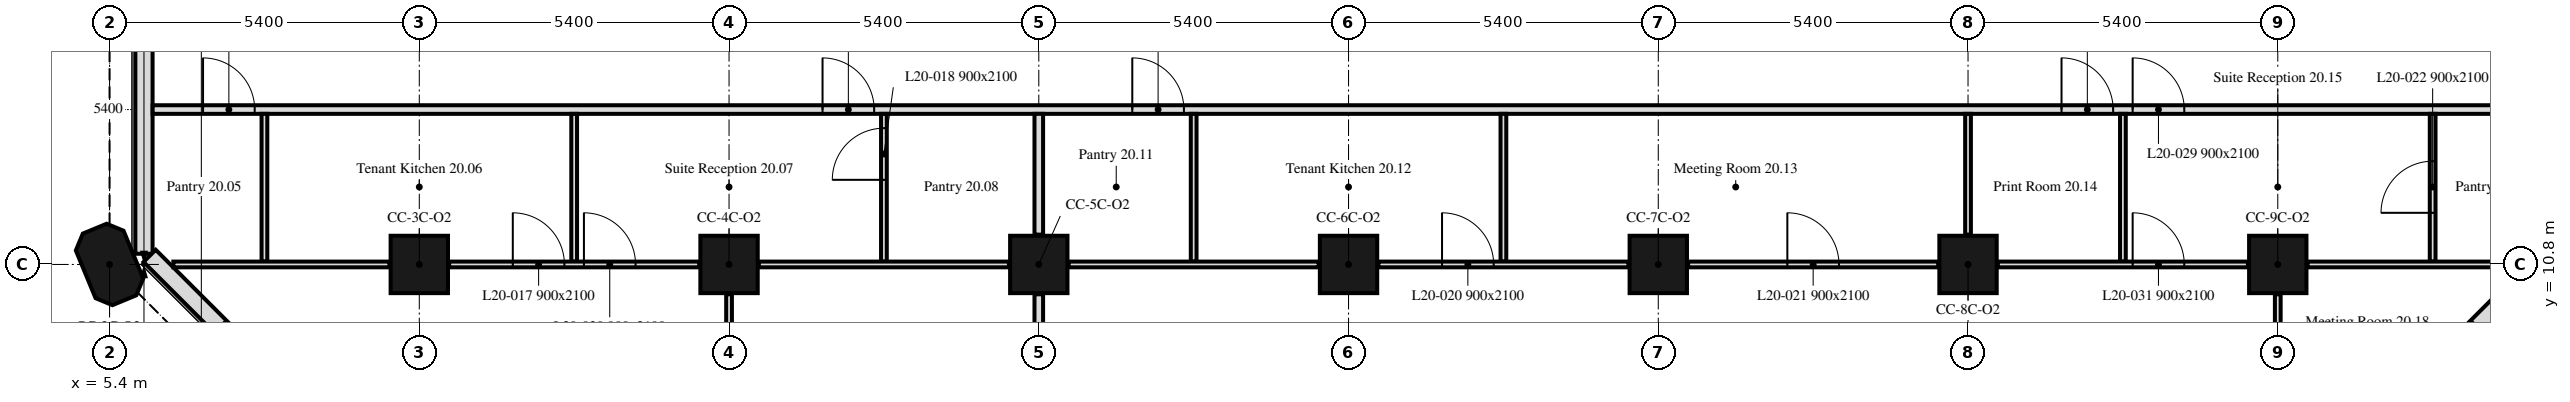
"""IFC4 building model, lengths in metres.
Left out: names, types, materials, properties, quantities, classifications, styles, units other than length and angle.
Written with IfcOpenShell. Run it as: python <this file> out.ifc"""

import sys

from ifc_helpers import new_model, si_unit, direction, frame, frame_2d, origin, origin_2d, place, context, subcontext, project, spatial, polyline, rectangle, outline, extrude, element, fill, save


model = new_model("IFC4")
c1 = context("Model", 3, precision=1e-05, world=origin(), true_north=direction((0.0, 1.0)))
c2 = subcontext(c1, "Body", "Model", "MODEL_VIEW")
j1 = project(units=[si_unit("LENGTHUNIT", "METRE"), si_unit("PLANEANGLEUNIT", "RADIAN")], contexts=[c1])
p1 = place(None, origin())
s1 = spatial("IfcSite", under=j1, at=p1, CompositionType="ELEMENT")
p2 = place(p1, origin())
s2 = spatial("IfcBuilding", under=s1, at=p2, CompositionType="ELEMENT")
p3 = place(p2, frame((0.0, 0.0, 87.8)))
s3 = spatial("IfcBuildingStorey", under=s2, at=p3, CompositionType="ELEMENT", Elevation=87.8)
p4 = place(p3, frame((5.4, 10.8, 0.0), z_axis=(0.0, 0.0, 1.0), x_axis=(-0.382683432365, 0.923879532511, 0.0)))
e1 = element("IfcColumn", 1, at=p4, inside=s3, PredefinedType="COLUMN", context=c2, shape_type="SweptSolid", body=[
    extrude(outline(polyline([(-0.45, -0.45), (0.45, -0.45), (0.675, -0.225), (0.675, 0.225), (0.45, 0.45), (-0.45, 0.45), (-0.675, 0.225), (-0.675, -0.225), (-0.45, -0.45)])), origin(), (0.0, 0.0, 1.0), 3.5),
])
for number, where, z_axis, x_axis in (
    (2, (10.8, 10.8, 0.0), (0.0, 0.0, 1.0), (1.0, 0.0, 0.0)),
    (3, (16.2, 10.8, 0.0), (0.0, 0.0, 1.0), (1.0, 0.0, 0.0)),
    (4, (21.6, 10.8, 0.0), (0.0, 0.0, 1.0), (1.0, 0.0, 0.0)),
    (5, (27.0, 10.8, 0.0), (0.0, 0.0, 1.0), (1.0, 0.0, 0.0)),
    (6, (32.4, 10.8, 0.0), (0.0, 0.0, 1.0), (1.0, 0.0, 0.0)),
    (7, (37.8, 10.8, 0.0), (0.0, 0.0, 1.0), (1.0, 0.0, 0.0)),
    (8, (43.2, 10.8, 0.0), (0.0, 0.0, 1.0), (1.0, 0.0, 0.0)),
):
    element("IfcColumn", number, at=place(p3, frame(where, z_axis=z_axis, x_axis=x_axis)), inside=s3, PredefinedType="COLUMN", context=c2, shape_type="SweptSolid", body=[
        extrude(rectangle(XDim=1.0, YDim=1.0, at=origin_2d()), origin(), (0.0, 0.0, 1.0), 3.5),
    ])
p5 = place(p3, frame((43.051, 6.099, 0.0), z_axis=(0.0, 0.0, 1.0), x_axis=(0.707106781187, 0.707106781187, 0.0)))
e9 = element("IfcWall", 9, at=p5, inside=s3, PredefinedType="SOLIDWALL", context=c2, shape_type="SweptSolid", body=[
    extrude(rectangle(XDim=6.86, YDim=0.3, at=frame_2d((3.43, 0.0))), origin(), (0.0, 0.0, 1.0), 3.5),
])
p6 = place(p5, frame((1.73, 0.0, 0.9)))
e10 = element("IfcOpeningElement", 10, at=p6, cuts=e9, PredefinedType="OPENING", context=c2, shape_type="SweptSolid", body=[
    extrude(rectangle(XDim=3.4, YDim=1.7, at=frame_2d((1.7, 0.85))), frame((0.0, 0.16, 0.0), z_axis=(0.0, -1.0, 0.0), x_axis=(1.0, 0.0, 0.0)), (0.0, 0.0, 1.0), 0.32),
])
p7 = place(p3, frame((6.0, 16.2, 0.0), z_axis=(0.0, 0.0, 1.0), x_axis=(0.0, -1.0, 0.0)))
e11 = element("IfcWall", 11, at=p7, inside=s3, PredefinedType="SOLIDWALL", context=c2, shape_type="SweptSolid", body=[
    extrude(rectangle(XDim=5.214, YDim=0.3, at=frame_2d((2.607, 0.0))), origin(), (0.0, 0.0, 1.0), 3.5),
])
p8 = place(p3, frame((6.099, 10.949, 0.0), z_axis=(0.0, 0.0, 1.0), x_axis=(0.707106781187, -0.707106781187, 0.0)))
e12 = element("IfcWall", 12, at=p8, inside=s3, PredefinedType="SOLIDWALL", context=c2, shape_type="SweptSolid", body=[
    extrude(rectangle(XDim=6.86, YDim=0.3, at=frame_2d((3.43, 0.0))), origin(), (0.0, 0.0, 1.0), 3.5),
])
p9 = place(p8, frame((1.73, 0.0, 0.9)))
e13 = element("IfcOpeningElement", 13, at=p9, cuts=e12, PredefinedType="OPENING", context=c2, shape_type="SweptSolid", body=[
    extrude(rectangle(XDim=3.4, YDim=1.7, at=frame_2d((1.7, 0.85))), frame((0.0, 0.16, 0.0), z_axis=(0.0, -1.0, 0.0), x_axis=(1.0, 0.0, 0.0)), (0.0, 0.0, 1.0), 0.32),
])
p10 = place(p3, frame((6.151, 13.5, 0.0), z_axis=(0.0, 0.0, 1.0), x_axis=(1.0, 0.0, 0.0)))
e14 = element("IfcWall", 14, at=p10, inside=s3, PredefinedType="PARTITIONING", context=c2, shape_type="SweptSolid", body=[
    extrude(rectangle(XDim=41.698, YDim=0.15, at=frame_2d((20.849, 0.0))), origin(), (0.0, 0.0, 1.0), 3.5),
])
p11 = place(p10, frame((0.879, 0.0, 0.0)))
e15 = element("IfcOpeningElement", 15, at=p11, cuts=e14, PredefinedType="OPENING", context=c2, shape_type="SweptSolid", body=[
    extrude(rectangle(XDim=0.9, YDim=2.1, at=frame_2d((0.45, 1.05))), frame((0.0, 0.075, 0.0), z_axis=(0.0, -1.0, 0.0), x_axis=(1.0, 0.0, 0.0)), (0.0, 0.0, 1.0), 0.15),
])
p12 = place(p10, frame((17.079, 0.0, 0.0)))
e16 = element("IfcOpeningElement", 16, at=p12, cuts=e14, PredefinedType="OPENING", context=c2, shape_type="SweptSolid", body=[
    extrude(rectangle(XDim=0.9, YDim=2.1, at=frame_2d((0.45, 1.05))), frame((0.0, 0.075, 0.0), z_axis=(0.0, -1.0, 0.0), x_axis=(1.0, 0.0, 0.0)), (0.0, 0.0, 1.0), 0.15),
])
p13 = place(p10, frame((33.279, 0.0, 0.0)))
e17 = element("IfcOpeningElement", 17, at=p13, cuts=e14, PredefinedType="OPENING", context=c2, shape_type="SweptSolid", body=[
    extrude(rectangle(XDim=0.9, YDim=2.1, at=frame_2d((0.45, 1.05))), frame((0.0, 0.075, 0.0), z_axis=(0.0, -1.0, 0.0), x_axis=(1.0, 0.0, 0.0)), (0.0, 0.0, 1.0), 0.15),
])
p14 = place(p10, frame((11.679, 0.0, 0.0)))
e18 = element("IfcOpeningElement", 18, at=p14, cuts=e14, PredefinedType="OPENING", context=c2, shape_type="SweptSolid", body=[
    extrude(rectangle(XDim=0.9, YDim=2.1, at=frame_2d((0.45, 1.05))), frame((0.0, 0.075, 0.0), z_axis=(0.0, -1.0, 0.0), x_axis=(1.0, 0.0, 0.0)), (0.0, 0.0, 1.0), 0.15),
])
p15 = place(p10, frame((34.519, 0.0, 0.0)))
e19 = element("IfcOpeningElement", 19, at=p15, cuts=e14, PredefinedType="OPENING", context=c2, shape_type="SweptSolid", body=[
    extrude(rectangle(XDim=0.9, YDim=2.1, at=frame_2d((0.45, 1.05))), frame((0.0, 0.075, 0.0), z_axis=(0.0, -1.0, 0.0), x_axis=(1.0, 0.0, 0.0)), (0.0, 0.0, 1.0), 0.15),
])
p16 = place(p3, frame((8.1, 10.85, 0.0), z_axis=(0.0, 0.0, 1.0), x_axis=(0.0, 1.0, 0.0)))
e20 = element("IfcWall", 20, at=p16, inside=s3, PredefinedType="PARTITIONING", context=c2, shape_type="SweptSolid", body=[
    extrude(rectangle(XDim=2.575, YDim=0.1, at=frame_2d((1.288, 0.0))), origin(), (0.0, 0.0, 1.0), 3.5),
])
p17 = place(p3, frame((6.512, 10.8, 0.0), z_axis=(0.0, 0.0, 1.0), x_axis=(1.0, 0.0, 0.0)))
e21 = element("IfcWall", 21, at=p17, inside=s3, PredefinedType="PARTITIONING", context=c2, shape_type="SweptSolid", body=[
    extrude(rectangle(XDim=3.768, YDim=0.1, at=frame_2d((1.884, 0.0))), origin(), (0.0, 0.0, 1.0), 3.5),
])
p18 = place(p3, frame((13.5, 10.85, 0.0), z_axis=(0.0, 0.0, 1.0), x_axis=(0.0, 1.0, 0.0)))
e22 = element("IfcWall", 22, at=p18, inside=s3, PredefinedType="PARTITIONING", context=c2, shape_type="SweptSolid", body=[
    extrude(rectangle(XDim=2.575, YDim=0.1, at=frame_2d((1.288, 0.0))), origin(), (0.0, 0.0, 1.0), 3.5),
])
p19 = place(p3, frame((11.32, 10.8, 0.0), z_axis=(0.0, 0.0, 1.0), x_axis=(1.0, 0.0, 0.0)))
e23 = element("IfcWall", 23, at=p19, inside=s3, PredefinedType="PARTITIONING", context=c2, shape_type="SweptSolid", body=[
    extrude(rectangle(XDim=4.36, YDim=0.1, at=frame_2d((2.18, 0.0))), origin(), (0.0, 0.0, 1.0), 3.5),
])
p20 = place(p19, frame((1.11, 0.0, 0.0)))
e24 = element("IfcOpeningElement", 24, at=p20, cuts=e23, PredefinedType="OPENING", context=c2, shape_type="SweptSolid", body=[
    extrude(rectangle(XDim=0.9, YDim=2.1, at=frame_2d((0.45, 1.05))), frame((0.0, 0.05, 0.0), z_axis=(0.0, -1.0, 0.0), x_axis=(1.0, 0.0, 0.0)), (0.0, 0.0, 1.0), 0.1),
])
p21 = place(p19, frame((2.35, 0.0, 0.0)))
e25 = element("IfcOpeningElement", 25, at=p21, cuts=e23, PredefinedType="OPENING", context=c2, shape_type="SweptSolid", body=[
    extrude(rectangle(XDim=0.9, YDim=2.1, at=frame_2d((0.45, 1.05))), frame((0.0, 0.05, 0.0), z_axis=(0.0, -1.0, 0.0), x_axis=(1.0, 0.0, 0.0)), (0.0, 0.0, 1.0), 0.1),
])
p22 = place(p3, frame((18.9, 10.85, 0.0), z_axis=(0.0, 0.0, 1.0), x_axis=(0.0, 1.0, 0.0)))
e26 = element("IfcWall", 26, at=p22, inside=s3, PredefinedType="PARTITIONING", context=c2, shape_type="SweptSolid", body=[
    extrude(rectangle(XDim=2.575, YDim=0.1, at=frame_2d((1.288, 0.0))), origin(), (0.0, 0.0, 1.0), 3.5),
])
p23 = place(p22, frame((1.425, 0.0, 0.0)))
e27 = element("IfcOpeningElement", 27, at=p23, cuts=e26, PredefinedType="OPENING", context=c2, shape_type="SweptSolid", body=[
    extrude(rectangle(XDim=0.9, YDim=2.1, at=frame_2d((0.45, 1.05))), frame((0.0, 0.05, 0.0), z_axis=(0.0, -1.0, 0.0), x_axis=(1.0, 0.0, 0.0)), (0.0, 0.0, 1.0), 0.1),
])
p24 = place(p3, frame((16.72, 10.8, 0.0), z_axis=(0.0, 0.0, 1.0), x_axis=(1.0, 0.0, 0.0)))
e28 = element("IfcWall", 28, at=p24, inside=s3, PredefinedType="PARTITIONING", context=c2, shape_type="SweptSolid", body=[
    extrude(rectangle(XDim=4.36, YDim=0.1, at=frame_2d((2.18, 0.0))), origin(), (0.0, 0.0, 1.0), 3.5),
])
p25 = place(p3, frame((21.6, 11.32, 0.0), z_axis=(0.0, 0.0, 1.0), x_axis=(0.0, 1.0, 0.0)))
e29 = element("IfcWall", 29, at=p25, inside=s3, PredefinedType="PARTITIONING", context=c2, shape_type="SweptSolid", body=[
    extrude(rectangle(XDim=2.105, YDim=0.15, at=frame_2d((1.052, 0.0))), origin(), (0.0, 0.0, 1.0), 3.5),
])
p26 = place(p3, frame((16.2, 6.151, 0.0), z_axis=(0.0, 0.0, 1.0), x_axis=(0.0, 1.0, 0.0)))
e30 = element("IfcWall", 30, at=p26, inside=s3, PredefinedType="PARTITIONING", context=c2, shape_type="SweptSolid", body=[
    extrude(rectangle(XDim=4.129, YDim=0.1, at=frame_2d((2.064, 0.0))), origin(), (0.0, 0.0, 1.0), 3.5),
])
p27 = place(p26, frame((1.499, 0.0, 0.0)))
e31 = element("IfcOpeningElement", 31, at=p27, cuts=e30, PredefinedType="OPENING", context=c2, shape_type="SweptSolid", body=[
    extrude(rectangle(XDim=0.9, YDim=2.1, at=frame_2d((0.45, 1.05))), frame((0.0, 0.05, 0.0), z_axis=(0.0, -1.0, 0.0), x_axis=(1.0, 0.0, 0.0)), (0.0, 0.0, 1.0), 0.1),
])
p28 = place(p3, frame((21.6, 6.151, 0.0), z_axis=(0.0, 0.0, 1.0), x_axis=(0.0, 1.0, 0.0)))
e32 = element("IfcWall", 32, at=p28, inside=s3, PredefinedType="PARTITIONING", context=c2, shape_type="SweptSolid", body=[
    extrude(rectangle(XDim=4.129, YDim=0.15, at=frame_2d((2.064, 0.0))), origin(), (0.0, 0.0, 1.0), 3.5),
])
p29 = place(p3, frame((24.3, 10.85, 0.0), z_axis=(0.0, 0.0, 1.0), x_axis=(0.0, 1.0, 0.0)))
e33 = element("IfcWall", 33, at=p29, inside=s3, PredefinedType="PARTITIONING", context=c2, shape_type="SweptSolid", body=[
    extrude(rectangle(XDim=2.575, YDim=0.1, at=frame_2d((1.288, 0.0))), origin(), (0.0, 0.0, 1.0), 3.5),
])
p30 = place(p3, frame((22.12, 10.8, 0.0), z_axis=(0.0, 0.0, 1.0), x_axis=(1.0, 0.0, 0.0)))
e34 = element("IfcWall", 34, at=p30, inside=s3, PredefinedType="PARTITIONING", context=c2, shape_type="SweptSolid", body=[
    extrude(rectangle(XDim=4.36, YDim=0.1, at=frame_2d((2.18, 0.0))), origin(), (0.0, 0.0, 1.0), 3.5),
])
p31 = place(p3, frame((29.7, 10.85, 0.0), z_axis=(0.0, 0.0, 1.0), x_axis=(0.0, 1.0, 0.0)))
e35 = element("IfcWall", 35, at=p31, inside=s3, PredefinedType="PARTITIONING", context=c2, shape_type="SweptSolid", body=[
    extrude(rectangle(XDim=2.575, YDim=0.1, at=frame_2d((1.288, 0.0))), origin(), (0.0, 0.0, 1.0), 3.5),
])
p32 = place(p3, frame((27.52, 10.8, 0.0), z_axis=(0.0, 0.0, 1.0), x_axis=(1.0, 0.0, 0.0)))
e36 = element("IfcWall", 36, at=p32, inside=s3, PredefinedType="PARTITIONING", context=c2, shape_type="SweptSolid", body=[
    extrude(rectangle(XDim=4.36, YDim=0.1, at=frame_2d((2.18, 0.0))), origin(), (0.0, 0.0, 1.0), 3.5),
])
p33 = place(p32, frame((1.11, 0.0, 0.0)))
e37 = element("IfcOpeningElement", 37, at=p33, cuts=e36, PredefinedType="OPENING", context=c2, shape_type="SweptSolid", body=[
    extrude(rectangle(XDim=0.9, YDim=2.1, at=frame_2d((0.45, 1.05))), frame((0.0, 0.05, 0.0), z_axis=(0.0, -1.0, 0.0), x_axis=(1.0, 0.0, 0.0)), (0.0, 0.0, 1.0), 0.1),
])
p34 = place(p3, frame((32.92, 10.8, 0.0), z_axis=(0.0, 0.0, 1.0), x_axis=(1.0, 0.0, 0.0)))
e38 = element("IfcWall", 38, at=p34, inside=s3, PredefinedType="PARTITIONING", context=c2, shape_type="SweptSolid", body=[
    extrude(rectangle(XDim=4.36, YDim=0.1, at=frame_2d((2.18, 0.0))), origin(), (0.0, 0.0, 1.0), 3.5),
])
p35 = place(p34, frame((1.73, 0.0, 0.0)))
e39 = element("IfcOpeningElement", 39, at=p35, cuts=e38, PredefinedType="OPENING", context=c2, shape_type="SweptSolid", body=[
    extrude(rectangle(XDim=0.9, YDim=2.1, at=frame_2d((0.45, 1.05))), frame((0.0, 0.05, 0.0), z_axis=(0.0, -1.0, 0.0), x_axis=(1.0, 0.0, 0.0)), (0.0, 0.0, 1.0), 0.1),
])
p36 = place(p3, frame((37.8, 11.32, 0.0), z_axis=(0.0, 0.0, 1.0), x_axis=(0.0, 1.0, 0.0)))
e40 = element("IfcWall", 40, at=p36, inside=s3, PredefinedType="PARTITIONING", context=c2, shape_type="SweptSolid", body=[
    extrude(rectangle(XDim=2.105, YDim=0.1, at=frame_2d((1.052, 0.0))), origin(), (0.0, 0.0, 1.0), 3.5),
])
p37 = place(p3, frame((40.5, 10.85, 0.0), z_axis=(0.0, 0.0, 1.0), x_axis=(0.0, 1.0, 0.0)))
e41 = element("IfcWall", 41, at=p37, inside=s3, PredefinedType="PARTITIONING", context=c2, shape_type="SweptSolid", body=[
    extrude(rectangle(XDim=2.575, YDim=0.1, at=frame_2d((1.288, 0.0))), origin(), (0.0, 0.0, 1.0), 3.5),
])
p38 = place(p3, frame((38.32, 10.8, 0.0), z_axis=(0.0, 0.0, 1.0), x_axis=(1.0, 0.0, 0.0)))
e42 = element("IfcWall", 42, at=p38, inside=s3, PredefinedType="PARTITIONING", context=c2, shape_type="SweptSolid", body=[
    extrude(rectangle(XDim=4.36, YDim=0.1, at=frame_2d((2.18, 0.0))), origin(), (0.0, 0.0, 1.0), 3.5),
])
p39 = place(p38, frame((2.35, 0.0, 0.0)))
e43 = element("IfcOpeningElement", 43, at=p39, cuts=e42, PredefinedType="OPENING", context=c2, shape_type="SweptSolid", body=[
    extrude(rectangle(XDim=0.9, YDim=2.1, at=frame_2d((0.45, 1.05))), frame((0.0, 0.05, 0.0), z_axis=(0.0, -1.0, 0.0), x_axis=(1.0, 0.0, 0.0)), (0.0, 0.0, 1.0), 0.1),
])
p40 = place(p3, frame((45.9, 10.85, 0.0), z_axis=(0.0, 0.0, 1.0), x_axis=(0.0, 1.0, 0.0)))
e44 = element("IfcWall", 44, at=p40, inside=s3, PredefinedType="PARTITIONING", context=c2, shape_type="SweptSolid", body=[
    extrude(rectangle(XDim=2.575, YDim=0.1, at=frame_2d((1.288, 0.0))), origin(), (0.0, 0.0, 1.0), 3.5),
])
p41 = place(p40, frame((0.85, 0.0, 0.0)))
e45 = element("IfcOpeningElement", 45, at=p41, cuts=e44, PredefinedType="OPENING", context=c2, shape_type="SweptSolid", body=[
    extrude(rectangle(XDim=0.9, YDim=2.1, at=frame_2d((0.45, 1.05))), frame((0.0, 0.05, 0.0), z_axis=(0.0, -1.0, 0.0), x_axis=(1.0, 0.0, 0.0)), (0.0, 0.0, 1.0), 0.1),
])
p42 = place(p3, frame((43.72, 10.8, 0.0), z_axis=(0.0, 0.0, 1.0), x_axis=(1.0, 0.0, 0.0)))
e46 = element("IfcWall", 46, at=p42, inside=s3, PredefinedType="PARTITIONING", context=c2, shape_type="SweptSolid", body=[
    extrude(rectangle(XDim=3.768, YDim=0.1, at=frame_2d((1.884, 0.0))), origin(), (0.0, 0.0, 1.0), 3.5),
])
p43 = place(p3, frame((43.2, 6.512, 0.0), z_axis=(0.0, 0.0, 1.0), x_axis=(0.0, 1.0, 0.0)))
e47 = element("IfcWall", 47, at=p43, inside=s3, PredefinedType="PARTITIONING", context=c2, shape_type="SweptSolid", body=[
    extrude(rectangle(XDim=3.768, YDim=0.1, at=frame_2d((1.884, 0.0))), origin(), (0.0, 0.0, 1.0), 3.5),
])
p44 = place(p43, frame((1.813, 0.0, 0.0)))
e48 = element("IfcOpeningElement", 48, at=p44, cuts=e47, PredefinedType="OPENING", context=c2, shape_type="SweptSolid", body=[
    extrude(rectangle(XDim=0.9, YDim=2.1, at=frame_2d((0.45, 1.05))), frame((0.0, 0.05, 0.0), z_axis=(0.0, -1.0, 0.0), x_axis=(1.0, 0.0, 0.0)), (0.0, 0.0, 1.0), 0.1),
])
p45 = place(p11, origin())
e49 = element("IfcDoor", 49, at=p45, inside=s3, OperationType="SINGLE_SWING_LEFT", PredefinedType="DOOR", context=c2, shape_type="SweptSolid", body=[
    extrude(rectangle(XDim=0.9, YDim=2.1, at=frame_2d((0.45, 1.05))), frame((0.0, 0.025, 0.0), z_axis=(0.0, -1.0, 0.0), x_axis=(1.0, 0.0, 0.0)), (0.0, 0.0, 1.0), 0.05),
])
fill(e15, e49)
p46 = place(p12, origin())
e50 = element("IfcDoor", 50, at=p46, inside=s3, OperationType="SINGLE_SWING_LEFT", PredefinedType="DOOR", context=c2, shape_type="SweptSolid", body=[
    extrude(rectangle(XDim=0.9, YDim=2.1, at=frame_2d((0.45, 1.05))), frame((0.0, 0.025, 0.0), z_axis=(0.0, -1.0, 0.0), x_axis=(1.0, 0.0, 0.0)), (0.0, 0.0, 1.0), 0.05),
])
fill(e16, e50)
p47 = place(p13, origin())
e51 = element("IfcDoor", 51, at=p47, inside=s3, OperationType="SINGLE_SWING_LEFT", PredefinedType="DOOR", context=c2, shape_type="SweptSolid", body=[
    extrude(rectangle(XDim=0.9, YDim=2.1, at=frame_2d((0.45, 1.05))), frame((0.0, 0.025, 0.0), z_axis=(0.0, -1.0, 0.0), x_axis=(1.0, 0.0, 0.0)), (0.0, 0.0, 1.0), 0.05),
])
fill(e17, e51)
p48 = place(p20, origin())
e52 = element("IfcDoor", 52, at=p48, inside=s3, OperationType="SINGLE_SWING_LEFT", PredefinedType="DOOR", context=c2, shape_type="SweptSolid", body=[
    extrude(rectangle(XDim=0.9, YDim=2.1, at=frame_2d((0.45, 1.05))), frame((0.0, 0.025, 0.0), z_axis=(0.0, -1.0, 0.0), x_axis=(1.0, 0.0, 0.0)), (0.0, 0.0, 1.0), 0.05),
])
fill(e24, e52)
p49 = place(p23, origin())
e53 = element("IfcDoor", 53, at=p49, inside=s3, OperationType="SINGLE_SWING_RIGHT", PredefinedType="DOOR", context=c2, shape_type="SweptSolid", body=[
    extrude(rectangle(XDim=0.9, YDim=2.1, at=frame_2d((0.45, 1.05))), frame((0.0, 0.025, 0.0), z_axis=(0.0, -1.0, 0.0), x_axis=(1.0, 0.0, 0.0)), (0.0, 0.0, 1.0), 0.05),
])
fill(e27, e53)
p50 = place(p33, origin())
e54 = element("IfcDoor", 54, at=p50, inside=s3, OperationType="SINGLE_SWING_LEFT", PredefinedType="DOOR", context=c2, shape_type="SweptSolid", body=[
    extrude(rectangle(XDim=0.9, YDim=2.1, at=frame_2d((0.45, 1.05))), frame((0.0, 0.025, 0.0), z_axis=(0.0, -1.0, 0.0), x_axis=(1.0, 0.0, 0.0)), (0.0, 0.0, 1.0), 0.05),
])
fill(e37, e54)
p51 = place(p35, origin())
e55 = element("IfcDoor", 55, at=p51, inside=s3, OperationType="SINGLE_SWING_LEFT", PredefinedType="DOOR", context=c2, shape_type="SweptSolid", body=[
    extrude(rectangle(XDim=0.9, YDim=2.1, at=frame_2d((0.45, 1.05))), frame((0.0, 0.025, 0.0), z_axis=(0.0, -1.0, 0.0), x_axis=(1.0, 0.0, 0.0)), (0.0, 0.0, 1.0), 0.05),
])
fill(e39, e55)
p52 = place(p41, origin())
e56 = element("IfcDoor", 56, at=p52, inside=s3, OperationType="SINGLE_SWING_LEFT", PredefinedType="DOOR", context=c2, shape_type="SweptSolid", body=[
    extrude(rectangle(XDim=0.9, YDim=2.1, at=frame_2d((0.45, 1.05))), frame((0.0, 0.025, 0.0), z_axis=(0.0, -1.0, 0.0), x_axis=(1.0, 0.0, 0.0)), (0.0, 0.0, 1.0), 0.05),
])
fill(e45, e56)
p53 = place(p14, origin())
e57 = element("IfcDoor", 57, at=p53, inside=s3, OperationType="SINGLE_SWING_LEFT", PredefinedType="DOOR", context=c2, shape_type="SweptSolid", body=[
    extrude(rectangle(XDim=0.9, YDim=2.1, at=frame_2d((0.45, 1.05))), frame((0.0, 0.025, 0.0), z_axis=(0.0, -1.0, 0.0), x_axis=(1.0, 0.0, 0.0)), (0.0, 0.0, 1.0), 0.05),
])
fill(e18, e57)
p54 = place(p15, origin())
e58 = element("IfcDoor", 58, at=p54, inside=s3, OperationType="SINGLE_SWING_RIGHT", PredefinedType="DOOR", context=c2, shape_type="SweptSolid", body=[
    extrude(rectangle(XDim=0.9, YDim=2.1, at=frame_2d((0.45, 1.05))), frame((0.0, 0.025, 0.0), z_axis=(0.0, -1.0, 0.0), x_axis=(1.0, 0.0, 0.0)), (0.0, 0.0, 1.0), 0.05),
])
fill(e19, e58)
p55 = place(p21, origin())
e59 = element("IfcDoor", 59, at=p55, inside=s3, OperationType="SINGLE_SWING_LEFT", PredefinedType="DOOR", context=c2, shape_type="SweptSolid", body=[
    extrude(rectangle(XDim=0.9, YDim=2.1, at=frame_2d((0.45, 1.05))), frame((0.0, 0.025, 0.0), z_axis=(0.0, -1.0, 0.0), x_axis=(1.0, 0.0, 0.0)), (0.0, 0.0, 1.0), 0.05),
])
fill(e25, e59)
p56 = place(p39, origin())
e60 = element("IfcDoor", 60, at=p56, inside=s3, OperationType="SINGLE_SWING_LEFT", PredefinedType="DOOR", context=c2, shape_type="SweptSolid", body=[
    extrude(rectangle(XDim=0.9, YDim=2.1, at=frame_2d((0.45, 1.05))), frame((0.0, 0.025, 0.0), z_axis=(0.0, -1.0, 0.0), x_axis=(1.0, 0.0, 0.0)), (0.0, 0.0, 1.0), 0.05),
])
fill(e43, e60)
save(model, sys.argv[1])
